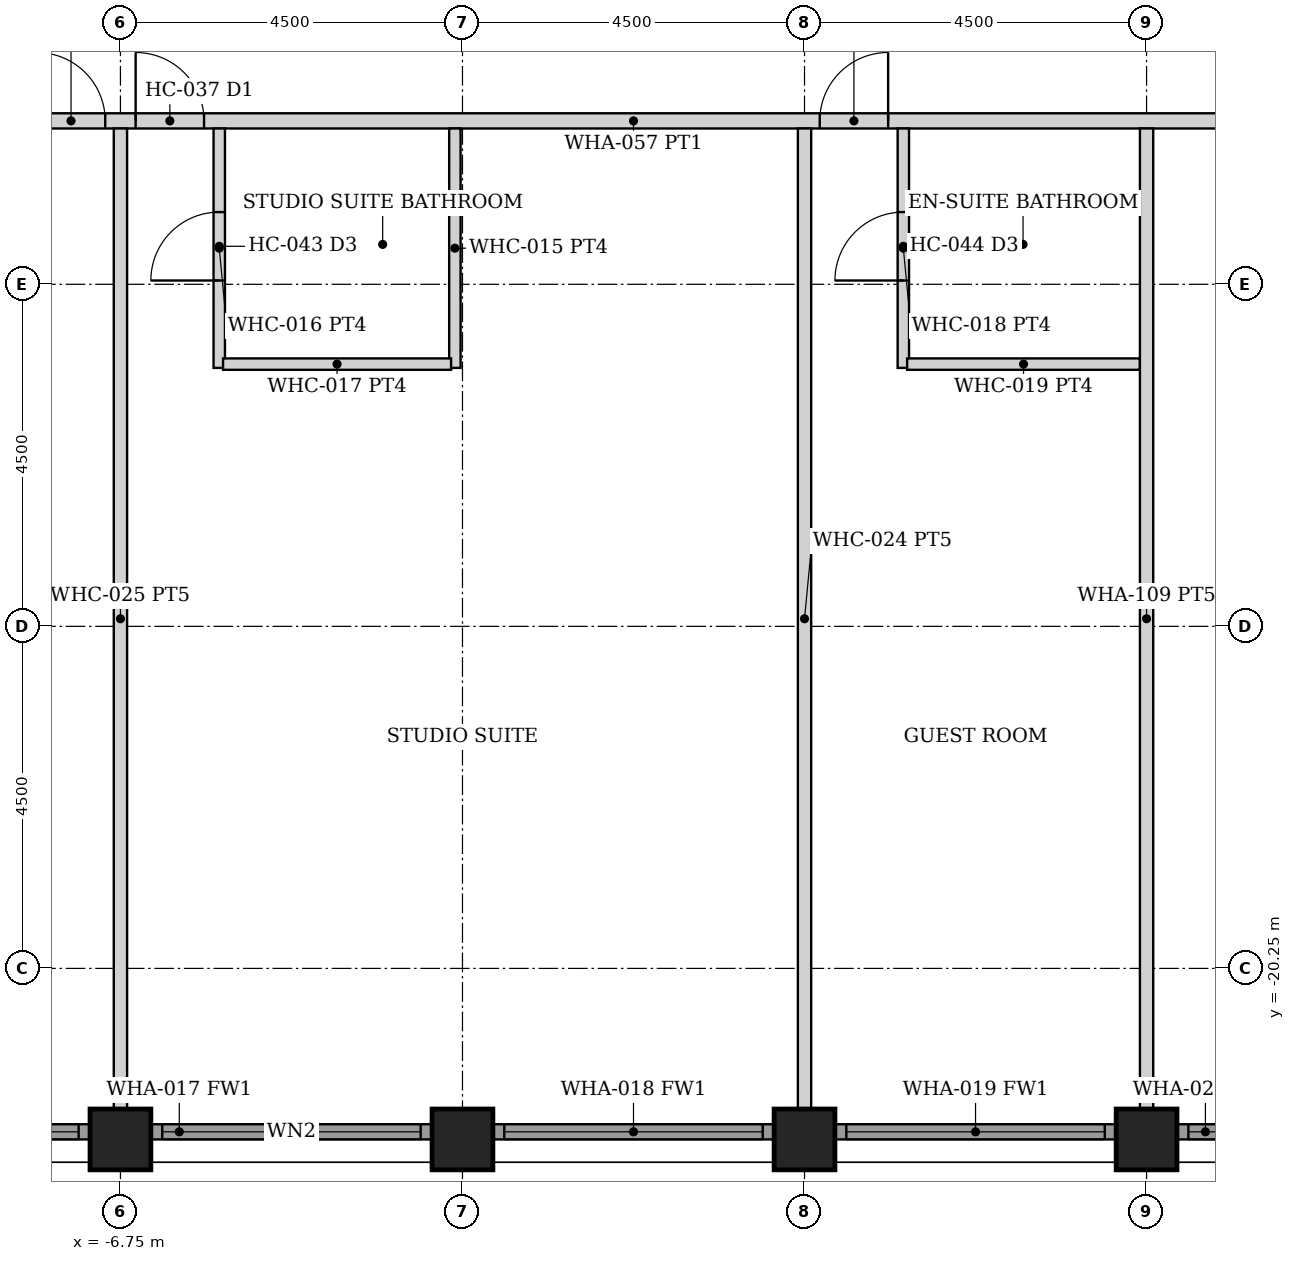
"""IFC4 building model, lengths in metres.
Left out: names, types, materials, properties, quantities, classifications, styles, units other than length and angle.
Written with IfcOpenShell. Run it as: python <this file> out.ifc"""

import sys

from ifc_helpers import new_model, si_unit, direction, frame, frame_2d, origin, origin_2d, place, context, subcontext, project, spatial, rectangle, hollow_rectangle, extrude, element, fill, save


model = new_model("IFC4")
c1 = context("Model", 3, precision=1e-05, world=origin(), true_north=direction((0.0, 1.0)))
c2 = subcontext(c1, "Body", "Model", "MODEL_VIEW")
j1 = project(units=[si_unit("LENGTHUNIT", "METRE"), si_unit("PLANEANGLEUNIT", "RADIAN")], contexts=[c1])
p1 = place(None, origin())
s1 = spatial("IfcSite", under=j1, at=p1, CompositionType="ELEMENT")
p2 = place(p1, origin())
s2 = spatial("IfcBuilding", under=s1, at=p2, CompositionType="ELEMENT")
p3 = place(p2, frame((0.0, 0.0, 140.0)))
s3 = spatial("IfcBuildingStorey", under=s2, at=p3, CompositionType="ELEMENT", Elevation=140.0)
for number, where, z_axis, x_axis in (
    (1, (-6.75, -22.5, 0.0), (0.0, 0.0, 1.0), (0.0, 1.0, 0.0)),
    (2, (-2.25, -22.5, 0.0), (0.0, 0.0, 1.0), (0.0, 1.0, 0.0)),
    (3, (2.25, -22.5, 0.0), (0.0, 0.0, 1.0), (0.0, 1.0, 0.0)),
    (4, (6.75, -22.5, 0.0), (0.0, 0.0, 1.0), (0.0, 1.0, 0.0)),
):
    element("IfcColumn", number, at=place(p3, frame(where, z_axis=z_axis, x_axis=x_axis)), inside=s3, PredefinedType="COLUMN", context=c2, shape_type="SweptSolid", body=[
        extrude(hollow_rectangle(XDim=0.8, YDim=0.8, WallThickness=0.05, at=origin_2d()), origin(), (0.0, 0.0, 1.0), 3.6),
    ])
p4 = place(p3, frame((-10.845, -22.4, 0.0), z_axis=(0.0, 0.0, 1.0), x_axis=(1.0, 0.0, 0.0)))
e5 = element("IfcWall", 5, at=p4, inside=s3, PredefinedType="SOLIDWALL", context=c2, shape_type="SweptSolid", body=[
    extrude(rectangle(XDim=3.69, YDim=0.2, at=frame_2d((1.845, 0.0))), origin(), (0.0, 0.0, 1.0), 2.479),
])
p5 = place(p4, frame((0.145, 0.0, 0.3)))
e6 = element("IfcOpeningElement", 6, at=p5, cuts=e5, PredefinedType="OPENING", context=c2, shape_type="SweptSolid", body=[
    extrude(rectangle(XDim=3.4, YDim=2.029, at=frame_2d((1.7, 1.015))), frame((0.0, 0.11, 0.0), z_axis=(0.0, -1.0, 0.0), x_axis=(1.0, 0.0, 0.0)), (0.0, 0.0, 1.0), 0.22),
])
p6 = place(p3, frame((-6.345, -22.4, 0.0), z_axis=(0.0, 0.0, 1.0), x_axis=(1.0, 0.0, 0.0)))
e7 = element("IfcWall", 7, at=p6, inside=s3, PredefinedType="SOLIDWALL", context=c2, shape_type="SweptSolid", body=[
    extrude(rectangle(XDim=3.69, YDim=0.2, at=frame_2d((1.845, 0.0))), origin(), (0.0, 0.0, 1.0), 2.479),
])
p7 = place(p6, frame((0.145, 0.0, 0.3)))
e8 = element("IfcOpeningElement", 8, at=p7, cuts=e7, PredefinedType="OPENING", context=c2, shape_type="SweptSolid", body=[
    extrude(rectangle(XDim=3.4, YDim=2.029, at=frame_2d((1.7, 1.015))), frame((0.0, 0.11, 0.0), z_axis=(0.0, -1.0, 0.0), x_axis=(1.0, 0.0, 0.0)), (0.0, 0.0, 1.0), 0.22),
])
p8 = place(p3, frame((-1.845, -22.4, 0.0), z_axis=(0.0, 0.0, 1.0), x_axis=(1.0, 0.0, 0.0)))
e9 = element("IfcWall", 9, at=p8, inside=s3, PredefinedType="SOLIDWALL", context=c2, shape_type="SweptSolid", body=[
    extrude(rectangle(XDim=3.69, YDim=0.2, at=frame_2d((1.845, 0.0))), origin(), (0.0, 0.0, 1.0), 2.479),
])
p9 = place(p8, frame((0.145, 0.0, 0.3)))
e10 = element("IfcOpeningElement", 10, at=p9, cuts=e9, PredefinedType="OPENING", context=c2, shape_type="SweptSolid", body=[
    extrude(rectangle(XDim=3.4, YDim=2.029, at=frame_2d((1.7, 1.015))), frame((0.0, 0.11, 0.0), z_axis=(0.0, -1.0, 0.0), x_axis=(1.0, 0.0, 0.0)), (0.0, 0.0, 1.0), 0.22),
])
p10 = place(p3, frame((2.655, -22.4, 0.0), z_axis=(0.0, 0.0, 1.0), x_axis=(1.0, 0.0, 0.0)))
e11 = element("IfcWall", 11, at=p10, inside=s3, PredefinedType="SOLIDWALL", context=c2, shape_type="SweptSolid", body=[
    extrude(rectangle(XDim=3.69, YDim=0.2, at=frame_2d((1.845, 0.0))), origin(), (0.0, 0.0, 1.0), 2.479),
])
p11 = place(p10, frame((0.145, 0.0, 0.3)))
e12 = element("IfcOpeningElement", 12, at=p11, cuts=e11, PredefinedType="OPENING", context=c2, shape_type="SweptSolid", body=[
    extrude(rectangle(XDim=3.4, YDim=2.029, at=frame_2d((1.7, 1.015))), frame((0.0, 0.11, 0.0), z_axis=(0.0, -1.0, 0.0), x_axis=(1.0, 0.0, 0.0)), (0.0, 0.0, 1.0), 0.22),
])
p12 = place(p3, frame((7.155, -22.4, 0.0), z_axis=(0.0, 0.0, 1.0), x_axis=(1.0, 0.0, 0.0)))
e13 = element("IfcWall", 13, at=p12, inside=s3, PredefinedType="SOLIDWALL", context=c2, shape_type="SweptSolid", body=[
    extrude(rectangle(XDim=3.69, YDim=0.2, at=frame_2d((1.845, 0.0))), origin(), (0.0, 0.0, 1.0), 2.479),
])
p13 = place(p12, frame((0.145, 0.0, 0.3)))
e14 = element("IfcOpeningElement", 14, at=p13, cuts=e13, PredefinedType="OPENING", context=c2, shape_type="SweptSolid", body=[
    extrude(rectangle(XDim=3.4, YDim=2.029, at=frame_2d((1.7, 1.015))), frame((0.0, 0.11, 0.0), z_axis=(0.0, -1.0, 0.0), x_axis=(1.0, 0.0, 0.0)), (0.0, 0.0, 1.0), 0.22),
])
p14 = place(p3, frame((-22.3, -9.1, 0.0), z_axis=(0.0, 0.0, 1.0), x_axis=(1.0, 0.0, 0.0)))
e15 = element("IfcWall", 15, at=p14, inside=s3, PredefinedType="PARTITIONING", context=c2, shape_type="SweptSolid", body=[
    extrude(rectangle(XDim=44.6, YDim=0.2, at=frame_2d((22.3, 0.0))), origin(), (0.0, 0.0, 1.0), 2.473),
])
p15 = place(p14, frame((6.75, 0.0, 0.0)))
e16 = element("IfcOpeningElement", 16, at=p15, cuts=e15, PredefinedType="OPENING", context=c2, shape_type="SweptSolid", body=[
    extrude(rectangle(XDim=0.9, YDim=2.1, at=frame_2d((0.45, 1.05))), frame((0.0, 0.11, 0.0), z_axis=(0.0, -1.0, 0.0), x_axis=(1.0, 0.0, 0.0)), (0.0, 0.0, 1.0), 0.22),
])
p16 = place(p14, frame((14.45, 0.0, 0.0)))
e17 = element("IfcOpeningElement", 17, at=p16, cuts=e15, PredefinedType="OPENING", context=c2, shape_type="SweptSolid", body=[
    extrude(rectangle(XDim=0.9, YDim=2.1, at=frame_2d((0.45, 1.05))), frame((0.0, 0.11, 0.0), z_axis=(0.0, -1.0, 0.0), x_axis=(1.0, 0.0, 0.0)), (0.0, 0.0, 1.0), 0.22),
])
p17 = place(p14, frame((15.75, 0.0, 0.0)))
e18 = element("IfcOpeningElement", 18, at=p17, cuts=e15, PredefinedType="OPENING", context=c2, shape_type="SweptSolid", body=[
    extrude(rectangle(XDim=0.9, YDim=2.1, at=frame_2d((0.45, 1.05))), frame((0.0, 0.11, 0.0), z_axis=(0.0, -1.0, 0.0), x_axis=(1.0, 0.0, 0.0)), (0.0, 0.0, 1.0), 0.22),
])
p18 = place(p14, frame((24.75, 0.0, 0.0)))
e19 = element("IfcOpeningElement", 19, at=p18, cuts=e15, PredefinedType="OPENING", context=c2, shape_type="SweptSolid", body=[
    extrude(rectangle(XDim=0.9, YDim=2.1, at=frame_2d((0.45, 1.05))), frame((0.0, 0.11, 0.0), z_axis=(0.0, -1.0, 0.0), x_axis=(1.0, 0.0, 0.0)), (0.0, 0.0, 1.0), 0.22),
])
p19 = place(p14, frame((36.95, 0.0, 0.0)))
e20 = element("IfcOpeningElement", 20, at=p19, cuts=e15, PredefinedType="OPENING", context=c2, shape_type="SweptSolid", body=[
    extrude(rectangle(XDim=0.9, YDim=2.1, at=frame_2d((0.45, 1.05))), frame((0.0, 0.11, 0.0), z_axis=(0.0, -1.0, 0.0), x_axis=(1.0, 0.0, 0.0)), (0.0, 0.0, 1.0), 0.22),
])
p20 = place(p14, frame((38.85, 0.0, 0.0)))
e21 = element("IfcOpeningElement", 21, at=p20, cuts=e15, PredefinedType="OPENING", context=c2, shape_type="SweptSolid", body=[
    extrude(rectangle(XDim=0.9, YDim=2.1, at=frame_2d((0.45, 1.05))), frame((0.0, 0.11, 0.0), z_axis=(0.0, -1.0, 0.0), x_axis=(1.0, 0.0, 0.0)), (0.0, 0.0, 1.0), 0.22),
])
p21 = place(p14, frame((4.85, 0.0, 0.0)))
e22 = element("IfcOpeningElement", 22, at=p21, cuts=e15, PredefinedType="OPENING", context=c2, shape_type="SweptSolid", body=[
    extrude(rectangle(XDim=0.9, YDim=2.1, at=frame_2d((0.45, 1.05))), frame((0.0, 0.11, 0.0), z_axis=(0.0, -1.0, 0.0), x_axis=(1.0, 0.0, 0.0)), (0.0, 0.0, 1.0), 0.22),
])
p22 = place(p3, frame((-5.45, -12.35, 0.0), z_axis=(0.0, 0.0, 1.0), x_axis=(0.0, 1.0, 0.0)))
e23 = element("IfcWall", 23, at=p22, inside=s3, PredefinedType="PARTITIONING", context=c2, shape_type="SweptSolid", body=[
    extrude(rectangle(XDim=3.15, YDim=0.15, at=frame_2d((1.575, 0.0))), origin(), (0.0, 0.0, 1.0), 2.473),
])
p23 = place(p22, frame((1.15, 0.0, 0.0)))
e24 = element("IfcOpeningElement", 24, at=p23, cuts=e23, PredefinedType="OPENING", context=c2, shape_type="SweptSolid", body=[
    extrude(rectangle(XDim=0.9, YDim=2.1, at=frame_2d((0.45, 1.05))), frame((0.0, 0.085, 0.0), z_axis=(0.0, -1.0, 0.0), x_axis=(1.0, 0.0, 0.0)), (0.0, 0.0, 1.0), 0.17),
])
p24 = place(p3, frame((-2.35, -12.35, 0.0), z_axis=(0.0, 0.0, 1.0), x_axis=(0.0, 1.0, 0.0)))
e25 = element("IfcWall", 25, at=p24, inside=s3, PredefinedType="PARTITIONING", context=c2, shape_type="SweptSolid", body=[
    extrude(rectangle(XDim=3.15, YDim=0.15, at=frame_2d((1.575, 0.0))), origin(), (0.0, 0.0, 1.0), 2.473),
])
p25 = place(p3, frame((-5.4, -12.3, 0.0), z_axis=(0.0, 0.0, 1.0), x_axis=(1.0, 0.0, 0.0)))
e26 = element("IfcWall", 26, at=p25, inside=s3, PredefinedType="PARTITIONING", context=c2, shape_type="SweptSolid", body=[
    extrude(rectangle(XDim=3.0, YDim=0.15, at=frame_2d((1.5, 0.0))), origin(), (0.0, 0.0, 1.0), 2.473),
])
p26 = place(p3, frame((3.55, -12.35, 0.0), z_axis=(0.0, 0.0, 1.0), x_axis=(0.0, 1.0, 0.0)))
e27 = element("IfcWall", 27, at=p26, inside=s3, PredefinedType="PARTITIONING", context=c2, shape_type="SweptSolid", body=[
    extrude(rectangle(XDim=3.15, YDim=0.15, at=frame_2d((1.575, 0.0))), origin(), (0.0, 0.0, 1.0), 2.473),
])
p27 = place(p26, frame((1.15, 0.0, 0.0)))
e28 = element("IfcOpeningElement", 28, at=p27, cuts=e27, PredefinedType="OPENING", context=c2, shape_type="SweptSolid", body=[
    extrude(rectangle(XDim=0.9, YDim=2.1, at=frame_2d((0.45, 1.05))), frame((0.0, 0.085, 0.0), z_axis=(0.0, -1.0, 0.0), x_axis=(1.0, 0.0, 0.0)), (0.0, 0.0, 1.0), 0.17),
])
p28 = place(p3, frame((3.6, -12.3, 0.0), z_axis=(0.0, 0.0, 1.0), x_axis=(1.0, 0.0, 0.0)))
e29 = element("IfcWall", 29, at=p28, inside=s3, PredefinedType="PARTITIONING", context=c2, shape_type="SweptSolid", body=[
    extrude(rectangle(XDim=3.062, YDim=0.15, at=frame_2d((1.531, 0.0))), origin(), (0.0, 0.0, 1.0), 2.473),
])
for number, where, z_axis, x_axis in (
    (30, (-6.75, -22.1, 0.0), (0.0, 0.0, 1.0), (0.0, 1.0, 0.0)),
    (31, (2.25, -22.1, 0.0), (0.0, 0.0, 1.0), (0.0, 1.0, 0.0)),
    (32, (6.75, -22.1, 0.0), (0.0, 0.0, 1.0), (0.0, 1.0, 0.0)),
):
    element("IfcWall", number, at=place(p3, frame(where, z_axis=z_axis, x_axis=x_axis)), inside=s3, PredefinedType="PARTITIONING", context=c2, shape_type="SweptSolid", body=[
        extrude(rectangle(XDim=12.9, YDim=0.175, at=frame_2d((6.45, 0.0))), origin(), (0.0, 0.0, 1.0), 2.473),
    ])
p29 = place(p5, origin())
e33 = element("IfcWindow", 33, at=p29, inside=s3, PartitioningType="SINGLE_PANEL", PredefinedType="WINDOW", context=c2, shape_type="SweptSolid", body=[
    extrude(rectangle(XDim=3.4, YDim=2.029, at=frame_2d((1.7, 1.015))), frame((0.0, 0.03, 0.0), z_axis=(0.0, -1.0, 0.0), x_axis=(1.0, 0.0, 0.0)), (0.0, 0.0, 1.0), 0.06),
])
fill(e6, e33)
p30 = place(p7, origin())
e34 = element("IfcWindow", 34, at=p30, inside=s3, PartitioningType="SINGLE_PANEL", PredefinedType="WINDOW", context=c2, shape_type="SweptSolid", body=[
    extrude(rectangle(XDim=3.4, YDim=2.029, at=frame_2d((1.7, 1.015))), frame((0.0, 0.03, 0.0), z_axis=(0.0, -1.0, 0.0), x_axis=(1.0, 0.0, 0.0)), (0.0, 0.0, 1.0), 0.06),
])
fill(e8, e34)
p31 = place(p9, origin())
e35 = element("IfcWindow", 35, at=p31, inside=s3, PartitioningType="SINGLE_PANEL", PredefinedType="WINDOW", context=c2, shape_type="SweptSolid", body=[
    extrude(rectangle(XDim=3.4, YDim=2.029, at=frame_2d((1.7, 1.015))), frame((0.0, 0.03, 0.0), z_axis=(0.0, -1.0, 0.0), x_axis=(1.0, 0.0, 0.0)), (0.0, 0.0, 1.0), 0.06),
])
fill(e10, e35)
p32 = place(p11, origin())
e36 = element("IfcWindow", 36, at=p32, inside=s3, PartitioningType="SINGLE_PANEL", PredefinedType="WINDOW", context=c2, shape_type="SweptSolid", body=[
    extrude(rectangle(XDim=3.4, YDim=2.029, at=frame_2d((1.7, 1.015))), frame((0.0, 0.03, 0.0), z_axis=(0.0, -1.0, 0.0), x_axis=(1.0, 0.0, 0.0)), (0.0, 0.0, 1.0), 0.06),
])
fill(e12, e36)
p33 = place(p13, origin())
e37 = element("IfcWindow", 37, at=p33, inside=s3, PartitioningType="SINGLE_PANEL", PredefinedType="WINDOW", context=c2, shape_type="SweptSolid", body=[
    extrude(rectangle(XDim=3.4, YDim=2.029, at=frame_2d((1.7, 1.015))), frame((0.0, 0.03, 0.0), z_axis=(0.0, -1.0, 0.0), x_axis=(1.0, 0.0, 0.0)), (0.0, 0.0, 1.0), 0.06),
])
fill(e14, e37)
p34 = place(p16, origin())
e38 = element("IfcDoor", 38, at=p34, inside=s3, OperationType="SINGLE_SWING_LEFT", PredefinedType="DOOR", context=c2, shape_type="SweptSolid", body=[
    extrude(rectangle(XDim=0.9, YDim=2.1, at=frame_2d((0.45, 1.05))), frame((0.0, 0.025, 0.0), z_axis=(0.0, -1.0, 0.0), x_axis=(1.0, 0.0, 0.0)), (0.0, 0.0, 1.0), 0.05),
])
fill(e17, e38)
p35 = place(p17, origin())
e39 = element("IfcDoor", 39, at=p35, inside=s3, OperationType="SINGLE_SWING_LEFT", PredefinedType="DOOR", context=c2, shape_type="SweptSolid", body=[
    extrude(rectangle(XDim=0.9, YDim=2.1, at=frame_2d((0.45, 1.05))), frame((0.0, 0.025, 0.0), z_axis=(0.0, -1.0, 0.0), x_axis=(1.0, 0.0, 0.0)), (0.0, 0.0, 1.0), 0.05),
])
fill(e18, e39)
p36 = place(p23, origin())
e40 = element("IfcDoor", 40, at=p36, inside=s3, OperationType="SINGLE_SWING_LEFT", PredefinedType="DOOR", context=c2, shape_type="SweptSolid", body=[
    extrude(rectangle(XDim=0.9, YDim=2.1, at=frame_2d((0.45, 1.05))), frame((0.0, 0.025, 0.0), z_axis=(0.0, -1.0, 0.0), x_axis=(1.0, 0.0, 0.0)), (0.0, 0.0, 1.0), 0.05),
])
fill(e24, e40)
p37 = place(p18, origin())
e41 = element("IfcDoor", 41, at=p37, inside=s3, OperationType="SINGLE_SWING_RIGHT", PredefinedType="DOOR", context=c2, shape_type="SweptSolid", body=[
    extrude(rectangle(XDim=0.9, YDim=2.1, at=frame_2d((0.45, 1.05))), frame((0.0, 0.025, 0.0), z_axis=(0.0, -1.0, 0.0), x_axis=(1.0, 0.0, 0.0)), (0.0, 0.0, 1.0), 0.05),
])
fill(e19, e41)
p38 = place(p27, origin())
e42 = element("IfcDoor", 42, at=p38, inside=s3, OperationType="SINGLE_SWING_LEFT", PredefinedType="DOOR", context=c2, shape_type="SweptSolid", body=[
    extrude(rectangle(XDim=0.9, YDim=2.1, at=frame_2d((0.45, 1.05))), frame((0.0, 0.025, 0.0), z_axis=(0.0, -1.0, 0.0), x_axis=(1.0, 0.0, 0.0)), (0.0, 0.0, 1.0), 0.05),
])
fill(e28, e42)
save(model, sys.argv[1])
